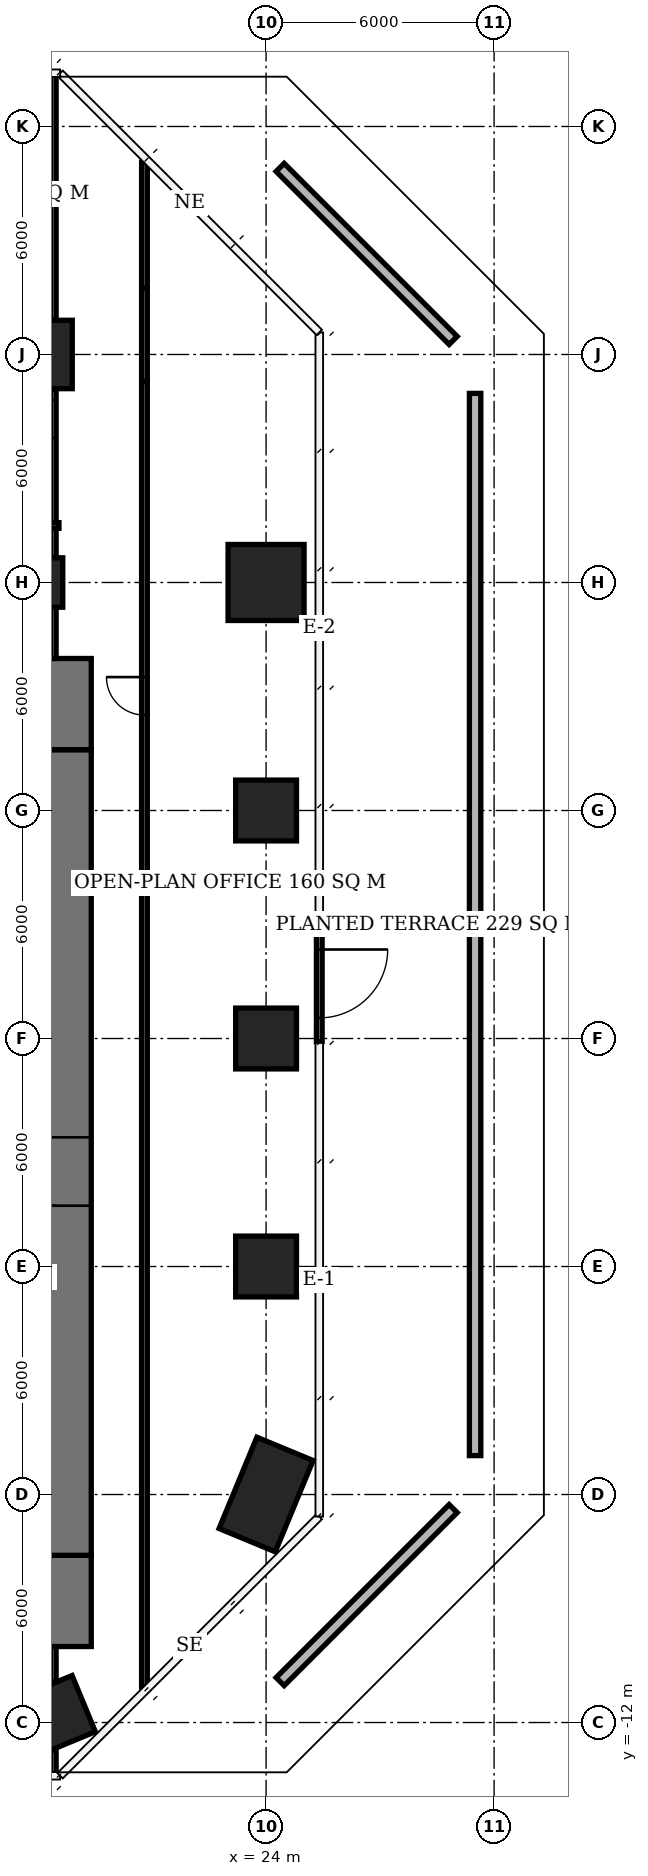
"""IFC4 building model, lengths in metres.
Left out: names, types, materials, properties, quantities, classifications, styles, units other than length and angle.
Written with IfcOpenShell. Run it as: python <this file> out.ifc"""

import sys

from ifc_helpers import new_model, si_unit, direction, frame, frame_2d, origin, origin_2d, place, context, subcontext, project, spatial, rectangle, extrude, element, fill, save


model = new_model("IFC4")
c1 = context("Model", 3, precision=1e-05, world=origin(), true_north=direction((0.0, 1.0)))
c2 = subcontext(c1, "Body", "Model", "MODEL_VIEW")
j1 = project(units=[si_unit("LENGTHUNIT", "METRE"), si_unit("PLANEANGLEUNIT", "RADIAN")], contexts=[c1])
p1 = place(None, origin())
s1 = spatial("IfcSite", under=j1, at=p1, CompositionType="ELEMENT")
p2 = place(p1, origin())
s2 = spatial("IfcBuilding", under=s1, at=p2, CompositionType="ELEMENT")
p3 = place(p2, frame((0.0, 0.0, 188.9)))
s3 = spatial("IfcBuildingStorey", under=s2, at=p3, CompositionType="ELEMENT", Elevation=188.9)
p4 = place(p3, frame((18.0, -12.0, 0.0), z_axis=(0.0, 0.0, 1.0), x_axis=(-0.923879532511, -0.382683432365, 0.0)))
e1 = element("IfcColumn", 1, at=p4, inside=s3, PredefinedType="COLUMN", context=c2, shape_type="SweptSolid", body=[
    extrude(rectangle(XDim=2.6, YDim=1.6, at=origin_2d()), origin(), (0.0, 0.0, 1.0), 3.9),
])
p5 = place(p3, frame((18.0, 18.0, 0.0), z_axis=(0.0, 0.0, 1.0), x_axis=(1.0, 0.0, 0.0)))
e2 = element("IfcColumn", 2, at=p5, inside=s3, PredefinedType="COLUMN", context=c2, shape_type="SweptSolid", body=[
    extrude(rectangle(XDim=1.3, YDim=1.3, at=origin_2d()), origin(), (0.0, 0.0, 1.0), 3.9),
])
p6 = place(p3, frame((18.0, 24.0, 0.0), z_axis=(0.0, 0.0, 1.0), x_axis=(1.0, 0.0, 0.0)))
e3 = element("IfcColumn", 3, at=p6, inside=s3, PredefinedType="COLUMN", context=c2, shape_type="SweptSolid", body=[
    extrude(rectangle(XDim=1.8, YDim=1.8, at=origin_2d()), origin(), (0.0, 0.0, 1.0), 3.9),
])
p7 = place(p3, frame((24.0, -6.0, 0.0), z_axis=(0.0, 0.0, 1.0), x_axis=(-0.382683432365, -0.923879532511, 0.0)))
e4 = element("IfcColumn", 4, at=p7, inside=s3, PredefinedType="COLUMN", context=c2, shape_type="SweptSolid", body=[
    extrude(rectangle(XDim=2.6, YDim=1.6, at=origin_2d()), origin(), (0.0, 0.0, 1.0), 3.9),
])
for number, where, z_axis, x_axis in (
    (5, (24.0, 0.0, 0.0), (0.0, 0.0, 1.0), (1.0, 0.0, 0.0)),
    (6, (24.0, 6.0, 0.0), (0.0, 0.0, 1.0), (1.0, 0.0, 0.0)),
    (7, (24.0, 12.0, 0.0), (0.0, 0.0, 1.0), (1.0, 0.0, 0.0)),
):
    element("IfcColumn", number, at=place(p3, frame(where, z_axis=z_axis, x_axis=x_axis)), inside=s3, PredefinedType="COLUMN", context=c2, shape_type="SweptSolid", body=[
        extrude(rectangle(XDim=1.6, YDim=1.6, at=origin_2d()), origin(), (0.0, 0.0, 1.0), 3.9),
    ])
p8 = place(p3, frame((24.0, 18.0, 0.0), z_axis=(0.0, 0.0, 1.0), x_axis=(1.0, 0.0, 0.0)))
e8 = element("IfcColumn", 8, at=p8, inside=s3, PredefinedType="COLUMN", context=c2, shape_type="SweptSolid", body=[
    extrude(rectangle(XDim=2.0, YDim=2.0, at=origin_2d()), origin(), (0.0, 0.0, 1.0), 3.9),
])
p9 = place(p3, frame((18.5, -7.6, 0.0), z_axis=(0.0, 0.0, 1.0), x_axis=(0.0, 1.0, 0.0)))
e9 = element("IfcWall", 9, at=p9, inside=s3, PredefinedType="SHEAR", context=c2, shape_type="SweptSolid", body=[
    extrude(rectangle(XDim=21.2, YDim=1.8, at=frame_2d((10.6, 0.0))), origin(), (0.0, 0.0, 1.0), 3.9),
])
p10 = place(p9, frame((9.2, 0.0, 0.0)))
e10 = element("IfcOpeningElement", 10, at=p10, cuts=e9, PredefinedType="OPENING", context=c2, shape_type="SweptSolid", body=[
    extrude(rectangle(XDim=1.8, YDim=2.4, at=frame_2d((0.9, 1.2))), frame((0.0, 0.91, 0.0), z_axis=(0.0, -1.0, 0.0), x_axis=(1.0, 0.0, 0.0)), (0.0, 0.0, 1.0), 1.82),
])
for number, where, z_axis, x_axis in (
    (11, (18.5, -10.0, 0.0), (0.0, 0.0, 1.0), (0.0, 1.0, 0.0)),
    (12, (18.5, 13.6, 0.0), (0.0, 0.0, 1.0), (0.0, 1.0, 0.0)),
):
    element("IfcWall", number, at=place(p3, frame(where, z_axis=z_axis, x_axis=x_axis)), inside=s3, PredefinedType="SHEAR", context=c2, shape_type="SweptSolid", body=[
        extrude(rectangle(XDim=2.4, YDim=1.8, at=frame_2d((1.2, 0.0))), origin(), (0.0, 0.0, 1.0), 3.9),
    ])
p11 = place(p3, frame((25.4, 9.042, 0.0), z_axis=(0.0, 0.0, 1.0), x_axis=(0.0, -1.0, 0.0)))
e13 = element("IfcWall", 13, at=p11, inside=s3, PredefinedType="USERDEFINED", context=c2, shape_type="SweptSolid", body=[
    extrude(rectangle(XDim=3.126, YDim=0.15, at=frame_2d((1.563, 0.0))), origin(), (0.0, 0.0, 1.0), 3.9),
])
p12 = place(p11, frame((0.7, 0.0, 0.0)))
e14 = element("IfcOpeningElement", 14, at=p12, cuts=e13, PredefinedType="OPENING", context=c2, shape_type="SweptSolid", body=[
    extrude(rectangle(XDim=1.8, YDim=2.4, at=frame_2d((0.9, 1.2))), frame((0.0, 0.085, 0.0), z_axis=(0.0, -1.0, 0.0), x_axis=(1.0, 0.0, 0.0)), (0.0, 0.0, 1.0), 0.17),
])
p13 = place(p3, frame((24.37, 28.923, 0.0), z_axis=(0.0, 0.0, 1.0), x_axis=(0.707106781187, -0.707106781187, 0.0)))
e15 = element("IfcWall", 15, at=p13, inside=s3, PredefinedType="USERDEFINED", context=c2, shape_type="SweptSolid", body=[
    extrude(rectangle(XDim=6.438, YDim=0.3, at=frame_2d((3.219, 0.0))), origin(), (0.0, 0.0, 1.0), 0.6),
])
p14 = place(p3, frame((29.5, 22.976, 0.0), z_axis=(0.0, 0.0, 1.0), x_axis=(0.0, -1.0, 0.0)))
e16 = element("IfcWall", 16, at=p14, inside=s3, PredefinedType="USERDEFINED", context=c2, shape_type="SweptSolid", body=[
    extrude(rectangle(XDim=27.953, YDim=0.3, at=frame_2d((13.976, 0.0))), origin(), (0.0, 0.0, 1.0), 0.6),
])
p15 = place(p3, frame((28.923, -6.37, 0.0), z_axis=(0.0, 0.0, 1.0), x_axis=(-0.707106781187, -0.707106781187, 0.0)))
e17 = element("IfcWall", 17, at=p15, inside=s3, PredefinedType="USERDEFINED", context=c2, shape_type="SweptSolid", body=[
    extrude(rectangle(XDim=6.438, YDim=0.3, at=frame_2d((3.219, 0.0))), origin(), (0.0, 0.0, 1.0), 0.6),
])
p16 = place(p3, frame((4.575, 19.5, 0.0), z_axis=(0.0, 0.0, 1.0), x_axis=(1.0, 0.0, 0.0)))
e18 = element("IfcWall", 18, at=p16, inside=s3, PredefinedType="PARTITIONING", context=c2, shape_type="SweptSolid", body=[
    extrude(rectangle(XDim=13.975, YDim=0.15, at=frame_2d((6.988, 0.0))), origin(), (0.0, 0.0, 1.0), 3.65),
])
p17 = place(p3, frame((18.4, -13.4, 0.0), z_axis=(0.0, 0.0, 1.0), x_axis=(0.0, 1.0, 0.0)))
e19 = element("IfcWall", 19, at=p17, inside=s3, PredefinedType="PARTITIONING", context=c2, shape_type="SweptSolid", body=[
    extrude(rectangle(XDim=0.669, YDim=0.15, at=frame_2d((0.334, 0.0))), origin(), (0.0, 0.0, 1.0), 3.65),
])
p18 = place(p3, frame((18.4, -10.937, 0.0), z_axis=(0.0, 0.0, 1.0), x_axis=(0.0, 1.0, 0.0)))
e20 = element("IfcWall", 20, at=p18, inside=s3, PredefinedType="PARTITIONING", context=c2, shape_type="SweptSolid", body=[
    extrude(rectangle(XDim=0.937, YDim=0.15, at=frame_2d((0.469, 0.0))), origin(), (0.0, 0.0, 1.0), 3.65),
])
p19 = place(p3, frame((18.4, 16.0, 0.0), z_axis=(0.0, 0.0, 1.0), x_axis=(0.0, 1.0, 0.0)))
e21 = element("IfcWall", 21, at=p19, inside=s3, PredefinedType="PARTITIONING", context=c2, shape_type="SweptSolid", body=[
    extrude(rectangle(XDim=1.35, YDim=0.15, at=frame_2d((0.675, 0.0))), origin(), (0.0, 0.0, 1.0), 3.65),
])
p20 = place(p3, frame((18.4, 18.65, 0.0), z_axis=(0.0, 0.0, 1.0), x_axis=(0.0, 1.0, 0.0)))
e22 = element("IfcWall", 22, at=p20, inside=s3, PredefinedType="PARTITIONING", context=c2, shape_type="SweptSolid", body=[
    extrude(rectangle(XDim=0.775, YDim=0.15, at=frame_2d((0.388, 0.0))), origin(), (0.0, 0.0, 1.0), 3.65),
])
p21 = place(p3, frame((18.4, 19.575, 0.0), z_axis=(0.0, 0.0, 1.0), x_axis=(0.0, 1.0, 0.0)))
e23 = element("IfcWall", 23, at=p21, inside=s3, PredefinedType="PARTITIONING", context=c2, shape_type="SweptSolid", body=[
    extrude(rectangle(XDim=3.525, YDim=0.15, at=frame_2d((1.763, 0.0))), origin(), (0.0, 0.0, 1.0), 3.65),
])
p22 = place(p21, frame((2.225, 0.0, 0.0)))
e24 = element("IfcOpeningElement", 24, at=p22, cuts=e23, PredefinedType="OPENING", context=c2, shape_type="SweptSolid", body=[
    extrude(rectangle(XDim=1.0, YDim=2.1, at=frame_2d((0.5, 1.05))), frame((0.0, 0.085, 0.0), z_axis=(0.0, -1.0, 0.0), x_axis=(1.0, 0.0, 0.0)), (0.0, 0.0, 1.0), 0.17),
])
p23 = place(p3, frame((18.4, 24.9, 0.0), z_axis=(0.0, 0.0, 1.0), x_axis=(0.0, 1.0, 0.0)))
e25 = element("IfcWall", 25, at=p23, inside=s3, PredefinedType="PARTITIONING", context=c2, shape_type="SweptSolid", body=[
    extrude(rectangle(XDim=3.24, YDim=0.15, at=frame_2d((1.62, 0.0))), origin(), (0.0, 0.0, 1.0), 2.65),
])
p24 = place(p3, frame((18.4, 28.14, 0.0), z_axis=(0.0, 0.0, 1.0), x_axis=(0.0, 1.0, 0.0)))
e26 = element("IfcWall", 26, at=p24, inside=s3, PredefinedType="PARTITIONING", context=c2, shape_type="SweptSolid", body=[
    extrude(rectangle(XDim=3.26, YDim=0.15, at=frame_2d((1.63, 0.0))), origin(), (0.0, 0.0, 1.0), 3.65),
])
p25 = place(p3, frame((20.8, -11.064, 0.0), z_axis=(0.0, 0.0, 1.0), x_axis=(0.0, 1.0, 0.0)))
e27 = element("IfcWall", 27, at=p25, inside=s3, PredefinedType="PARTITIONING", context=c2, shape_type="SweptSolid", body=[
    extrude(rectangle(XDim=34.354, YDim=0.15, at=frame_2d((17.177, 0.0))), origin(), (0.0, 0.0, 1.0), 3.65),
])
p26 = place(p25, frame((25.575, 0.0, 0.0)))
e28 = element("IfcOpeningElement", 28, at=p26, cuts=e27, PredefinedType="OPENING", context=c2, shape_type="SweptSolid", body=[
    extrude(rectangle(XDim=1.0, YDim=2.1, at=frame_2d((0.5, 1.05))), frame((0.0, 0.085, 0.0), z_axis=(0.0, -1.0, 0.0), x_axis=(1.0, 0.0, 0.0)), (0.0, 0.0, 1.0), 0.17),
])
p27 = place(p3, frame((20.8, 23.29, 0.0), z_axis=(0.0, 0.0, 1.0), x_axis=(0.0, 1.0, 0.0)))
e29 = element("IfcWall", 29, at=p27, inside=s3, PredefinedType="PARTITIONING", context=c2, shape_type="SweptSolid", body=[
    extrude(rectangle(XDim=2.45, YDim=0.15, at=frame_2d((1.225, 0.0))), origin(), (0.0, 0.0, 1.0), 2.65),
])
p28 = place(p3, frame((20.8, 25.74, 0.0), z_axis=(0.0, 0.0, 1.0), x_axis=(0.0, 1.0, 0.0)))
e30 = element("IfcWall", 30, at=p28, inside=s3, PredefinedType="PARTITIONING", context=c2, shape_type="SweptSolid", body=[
    extrude(rectangle(XDim=3.324, YDim=0.15, at=frame_2d((1.662, 0.0))), origin(), (0.0, 0.0, 1.0), 3.65),
])
p29 = place(p12, origin())
e31 = element("IfcDoor", 31, at=p29, inside=s3, OperationType="DOUBLE_DOOR_SINGLE_SWING", PredefinedType="DOOR", context=c2, shape_type="SweptSolid", body=[
    extrude(rectangle(XDim=1.8, YDim=2.4, at=frame_2d((0.9, 1.2))), frame((0.0, 0.025, 0.0), z_axis=(0.0, -1.0, 0.0), x_axis=(1.0, 0.0, 0.0)), (0.0, 0.0, 1.0), 0.05),
])
fill(e14, e31)
p30 = place(p10, origin())
e32 = element("IfcDoor", 32, at=p30, inside=s3, OperationType="DOUBLE_DOOR_SINGLE_SWING", PredefinedType="DOOR", context=c2, shape_type="SweptSolid", body=[
    extrude(rectangle(XDim=1.8, YDim=2.4, at=frame_2d((0.9, 1.2))), frame((0.0, 0.025, 0.0), z_axis=(0.0, -1.0, 0.0), x_axis=(1.0, 0.0, 0.0)), (0.0, 0.0, 1.0), 0.05),
])
fill(e10, e32)
p31 = place(p26, origin())
e33 = element("IfcDoor", 33, at=p31, inside=s3, OperationType="SINGLE_SWING_RIGHT", PredefinedType="DOOR", context=c2, shape_type="SweptSolid", body=[
    extrude(rectangle(XDim=1.0, YDim=2.1, at=frame_2d((0.5, 1.05))), frame((0.0, 0.025, 0.0), z_axis=(0.0, -1.0, 0.0), x_axis=(1.0, 0.0, 0.0)), (0.0, 0.0, 1.0), 0.05),
])
fill(e28, e33)
p32 = place(p22, origin())
e34 = element("IfcDoor", 34, at=p32, inside=s3, OperationType="SINGLE_SWING_RIGHT", PredefinedType="DOOR", context=c2, shape_type="SweptSolid", body=[
    extrude(rectangle(XDim=1.0, YDim=2.1, at=frame_2d((0.5, 1.05))), frame((0.0, 0.025, 0.0), z_axis=(0.0, -1.0, 0.0), x_axis=(1.0, 0.0, 0.0)), (0.0, 0.0, 1.0), 0.05),
])
fill(e24, e34)
save(model, sys.argv[1])
